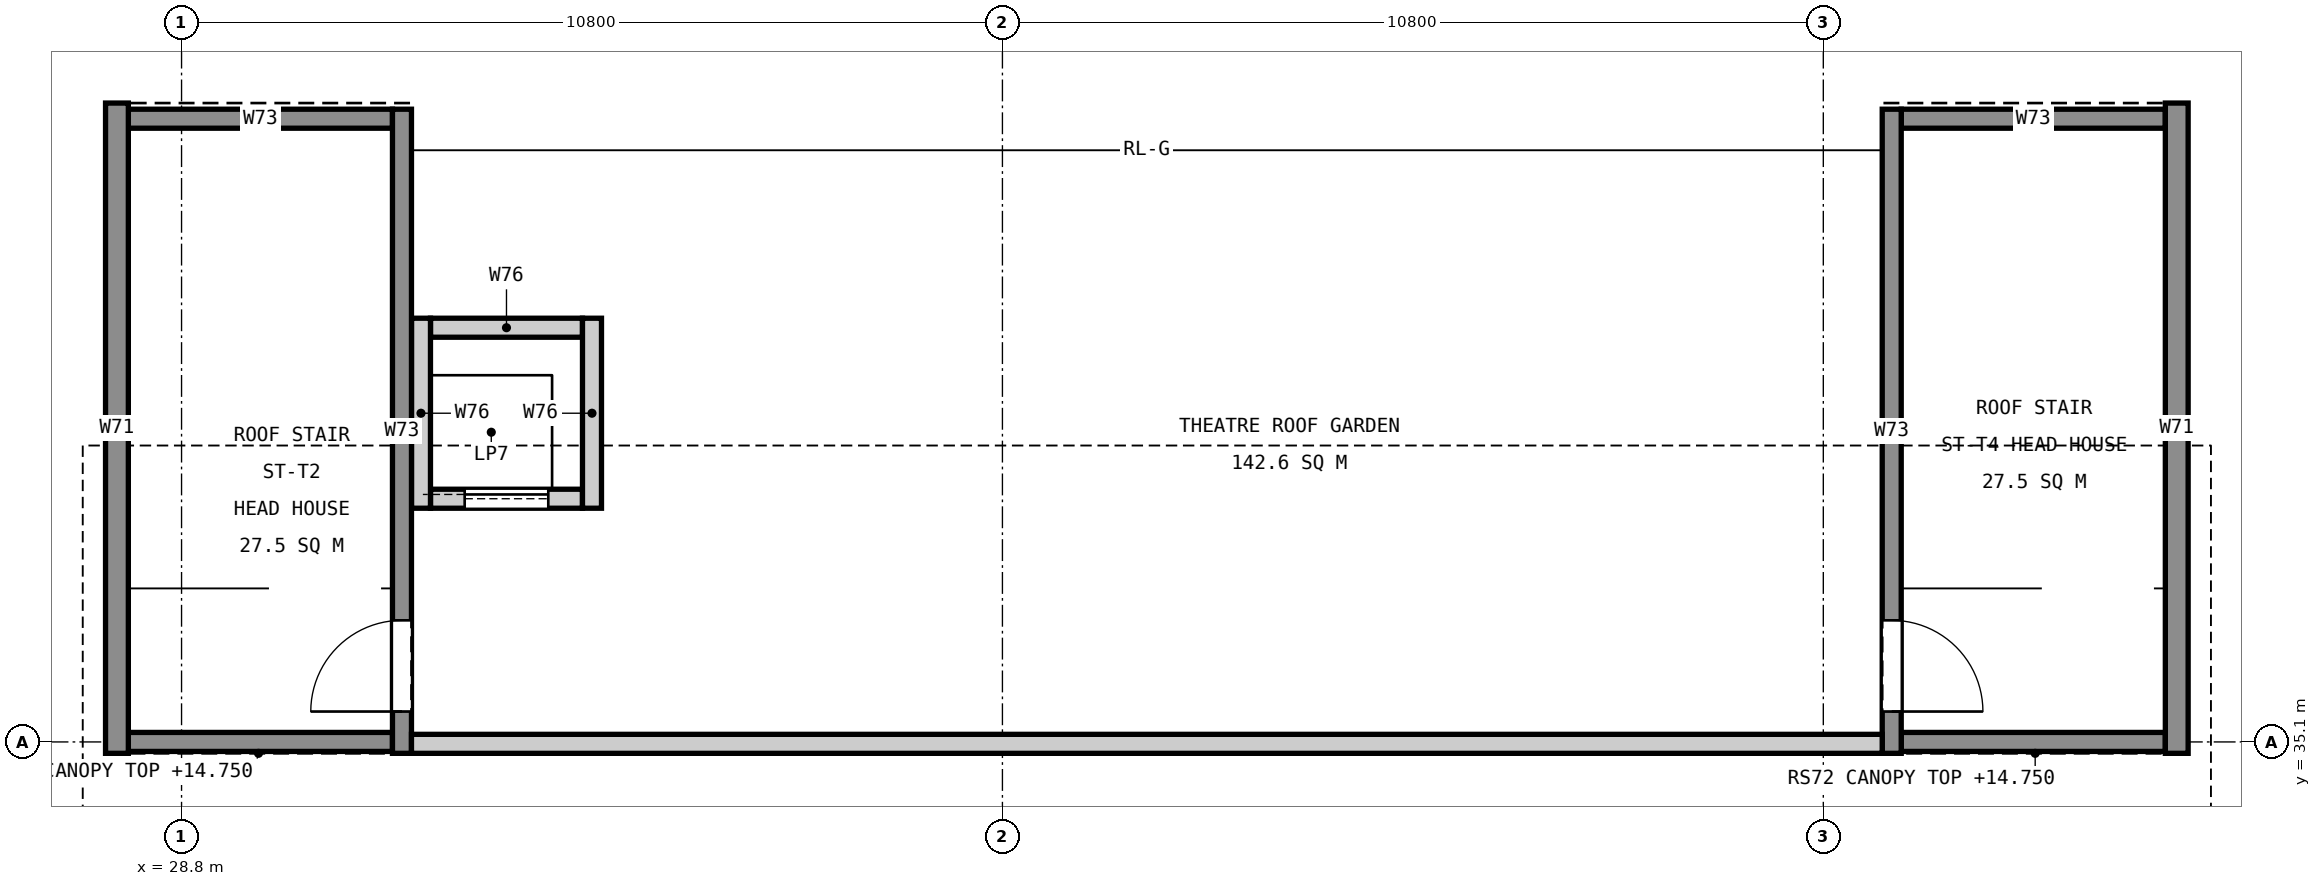
"""IFC4 building model, lengths in metres.
Left out: names, types, materials, properties, quantities, classifications, styles, units other than length and angle.
Written with IfcOpenShell. Run it as: python <this file> out.ifc"""

import sys

from ifc_helpers import new_model, si_unit, direction, frame, frame_2d, origin, place, context, subcontext, project, spatial, rectangle, extrude, element, fill, save


model = new_model("IFC4")
c1 = context("Model", 3, precision=1e-05, world=origin(), true_north=direction((0.0, 1.0)))
c2 = subcontext(c1, "Body", "Model", "MODEL_VIEW")
j1 = project(units=[si_unit("LENGTHUNIT", "METRE"), si_unit("PLANEANGLEUNIT", "RADIAN")], contexts=[c1])
p1 = place(None, origin())
s1 = spatial("IfcSite", under=j1, at=p1, CompositionType="ELEMENT")
p2 = place(p1, origin())
s2 = spatial("IfcBuilding", under=s1, at=p2, CompositionType="ELEMENT")
p3 = place(p2, frame((0.0, 0.0, 11.4)))
s3 = spatial("IfcBuildingStorey", under=s2, at=p3, CompositionType="ELEMENT", Elevation=11.4)
p4 = place(p3, frame((32.075, 38.3, 0.0), z_axis=(0.0, 0.0, 1.0), x_axis=(1.0, 0.0, 0.0)))
e1 = element("IfcWall", 1, at=p4, inside=s3, PredefinedType="SOLIDWALL", context=c2, shape_type="SweptSolid", body=[
    extrude(rectangle(XDim=2.0, YDim=0.25, at=frame_2d((1.0, 0.0))), origin(), (0.0, 0.0, 1.0), 5.1),
])
p5 = place(p4, frame((0.45, 0.0, 0.0)))
e2 = element("IfcOpeningElement", 2, at=p5, cuts=e1, PredefinedType="OPENING", context=c2, shape_type="SweptSolid", body=[
    extrude(rectangle(XDim=1.1, YDim=2.1, at=frame_2d((0.55, 1.05))), frame((0.0, 0.135, 0.0), z_axis=(0.0, -1.0, 0.0), x_axis=(1.0, 0.0, 0.0)), (0.0, 0.0, 1.0), 0.27),
])
p6 = place(p3, frame((32.075, 40.55, 0.0), z_axis=(0.0, 0.0, 1.0), x_axis=(1.0, 0.0, 0.0)))
e3 = element("IfcWall", 3, at=p6, inside=s3, PredefinedType="SOLIDWALL", context=c2, shape_type="SweptSolid", body=[
    extrude(rectangle(XDim=2.0, YDim=0.25, at=frame_2d((1.0, 0.0))), origin(), (0.0, 0.0, 1.0), 5.1),
])
for number, where, z_axis, x_axis in (
    (4, (31.95, 38.175, 0.0), (0.0, 0.0, 1.0), (0.0, 1.0, 0.0)),
    (5, (34.2, 38.175, 0.0), (0.0, 0.0, 1.0), (0.0, 1.0, 0.0)),
):
    element("IfcWall", number, at=place(p3, frame(where, z_axis=z_axis, x_axis=x_axis)), inside=s3, PredefinedType="SOLIDWALL", context=c2, shape_type="SweptSolid", body=[
        extrude(rectangle(XDim=2.5, YDim=0.25, at=frame_2d((1.25, 0.0))), origin(), (0.0, 0.0, 1.0), 5.1),
    ])
for number, where, z_axis, x_axis in (
    (6, (28.1, 35.1, 0.0), (0.0, 0.0, 1.0), (1.0, 0.0, 0.0)),
    (7, (28.1, 43.3, 0.0), (0.0, 0.0, 1.0), (1.0, 0.0, 0.0)),
):
    element("IfcWall", number, at=place(p3, frame(where, z_axis=z_axis, x_axis=x_axis)), inside=s3, PredefinedType="SOLIDWALL", context=c2, shape_type="SweptSolid", body=[
        extrude(rectangle(XDim=3.475, YDim=0.25, at=frame_2d((1.737, 0.0))), origin(), (0.0, 0.0, 1.0), 3.0),
    ])
p7 = place(p3, frame((27.95, 34.95, 0.0), z_axis=(0.0, 0.0, 1.0), x_axis=(0.0, 1.0, 0.0)))
e8 = element("IfcWall", 8, at=p7, inside=s3, PredefinedType="SOLIDWALL", context=c2, shape_type="SweptSolid", body=[
    extrude(rectangle(XDim=8.556, YDim=0.3, at=frame_2d((4.278, 0.0))), origin(), (0.0, 0.0, 1.0), 3.0),
])
p8 = place(p3, frame((31.7, 34.95, 0.0), z_axis=(0.0, 0.0, 1.0), x_axis=(0.0, 1.0, 0.0)))
e9 = element("IfcWall", 9, at=p8, inside=s3, PredefinedType="SOLIDWALL", context=c2, shape_type="SweptSolid", body=[
    extrude(rectangle(XDim=8.475, YDim=0.25, at=frame_2d((4.238, 0.0))), origin(), (0.0, 0.0, 1.0), 3.0),
])
p9 = place(p8, frame((0.55, 0.0, 0.0)))
e10 = element("IfcOpeningElement", 10, at=p9, cuts=e9, PredefinedType="OPENING", context=c2, shape_type="SweptSolid", body=[
    extrude(rectangle(XDim=1.2, YDim=2.1, at=frame_2d((0.6, 1.05))), frame((0.0, 0.135, 0.0), z_axis=(0.0, -1.0, 0.0), x_axis=(1.0, 0.0, 0.0)), (0.0, 0.0, 1.0), 0.27),
])
for number, where, z_axis, x_axis in (
    (11, (51.425, 35.1, 0.0), (0.0, 0.0, 1.0), (1.0, 0.0, 0.0)),
    (12, (51.425, 43.3, 0.0), (0.0, 0.0, 1.0), (1.0, 0.0, 0.0)),
):
    element("IfcWall", number, at=place(p3, frame(where, z_axis=z_axis, x_axis=x_axis)), inside=s3, PredefinedType="SOLIDWALL", context=c2, shape_type="SweptSolid", body=[
        extrude(rectangle(XDim=3.475, YDim=0.25, at=frame_2d((1.737, 0.0))), origin(), (0.0, 0.0, 1.0), 3.0),
    ])
p10 = place(p3, frame((55.05, 34.95, 0.0), z_axis=(0.0, 0.0, 1.0), x_axis=(0.0, 1.0, 0.0)))
e13 = element("IfcWall", 13, at=p10, inside=s3, PredefinedType="SOLIDWALL", context=c2, shape_type="SweptSolid", body=[
    extrude(rectangle(XDim=8.556, YDim=0.3, at=frame_2d((4.278, 0.0))), origin(), (0.0, 0.0, 1.0), 3.0),
])
p11 = place(p3, frame((51.3, 34.95, 0.0), z_axis=(0.0, 0.0, 1.0), x_axis=(0.0, 1.0, 0.0)))
e14 = element("IfcWall", 14, at=p11, inside=s3, PredefinedType="SOLIDWALL", context=c2, shape_type="SweptSolid", body=[
    extrude(rectangle(XDim=8.475, YDim=0.25, at=frame_2d((4.238, 0.0))), origin(), (0.0, 0.0, 1.0), 3.0),
])
p12 = place(p11, frame((0.55, 0.0, 0.0)))
e15 = element("IfcOpeningElement", 15, at=p12, cuts=e14, PredefinedType="OPENING", context=c2, shape_type="SweptSolid", body=[
    extrude(rectangle(XDim=1.2, YDim=2.1, at=frame_2d((0.6, 1.05))), frame((0.0, 0.135, 0.0), z_axis=(0.0, -1.0, 0.0), x_axis=(1.0, 0.0, 0.0)), (0.0, 0.0, 1.0), 0.27),
])
p13 = place(p3, frame((31.825, 35.075, 0.0), z_axis=(0.0, 0.0, 1.0), x_axis=(1.0, 0.0, 0.0)))
e16 = element("IfcWall", 16, at=p13, inside=s3, PredefinedType="SOLIDWALL", context=c2, shape_type="SweptSolid", body=[
    extrude(rectangle(XDim=19.35, YDim=0.25, at=frame_2d((9.675, 0.0))), origin(), (0.0, 0.0, 1.0), 1.2),
])
p14 = place(p9, origin())
e17 = element("IfcDoor", 17, at=p14, inside=s3, OperationType="SINGLE_SWING_LEFT", PredefinedType="DOOR", context=c2, shape_type="SweptSolid", body=[
    extrude(rectangle(XDim=1.2, YDim=2.1, at=frame_2d((0.6, 1.05))), frame((0.0, 0.025, 0.0), z_axis=(0.0, -1.0, 0.0), x_axis=(1.0, 0.0, 0.0)), (0.0, 0.0, 1.0), 0.05),
])
fill(e10, e17)
p15 = place(p12, frame((1.2, 0.0, 0.0), z_axis=(0.0, 0.0, 1.0), x_axis=(-1.0, 0.0, 0.0)))
e18 = element("IfcDoor", 18, at=p15, inside=s3, OperationType="SINGLE_SWING_RIGHT", PredefinedType="DOOR", context=c2, shape_type="SweptSolid", body=[
    extrude(rectangle(XDim=1.2, YDim=2.1, at=frame_2d((0.6, 1.05))), frame((0.0, 0.025, 0.0), z_axis=(0.0, -1.0, 0.0), x_axis=(1.0, 0.0, 0.0)), (0.0, 0.0, 1.0), 0.05),
])
fill(e15, e18)
p16 = place(p5, origin())
e19 = element("IfcDoor", 19, at=p16, inside=s3, OperationType="SLIDING_TO_LEFT", PredefinedType="DOOR", context=c2, shape_type="SweptSolid", body=[
    extrude(rectangle(XDim=1.1, YDim=2.1, at=frame_2d((0.55, 1.05))), frame((0.0, 0.025, 0.0), z_axis=(0.0, -1.0, 0.0), x_axis=(1.0, 0.0, 0.0)), (0.0, 0.0, 1.0), 0.05),
])
fill(e2, e19)
save(model, sys.argv[1])
